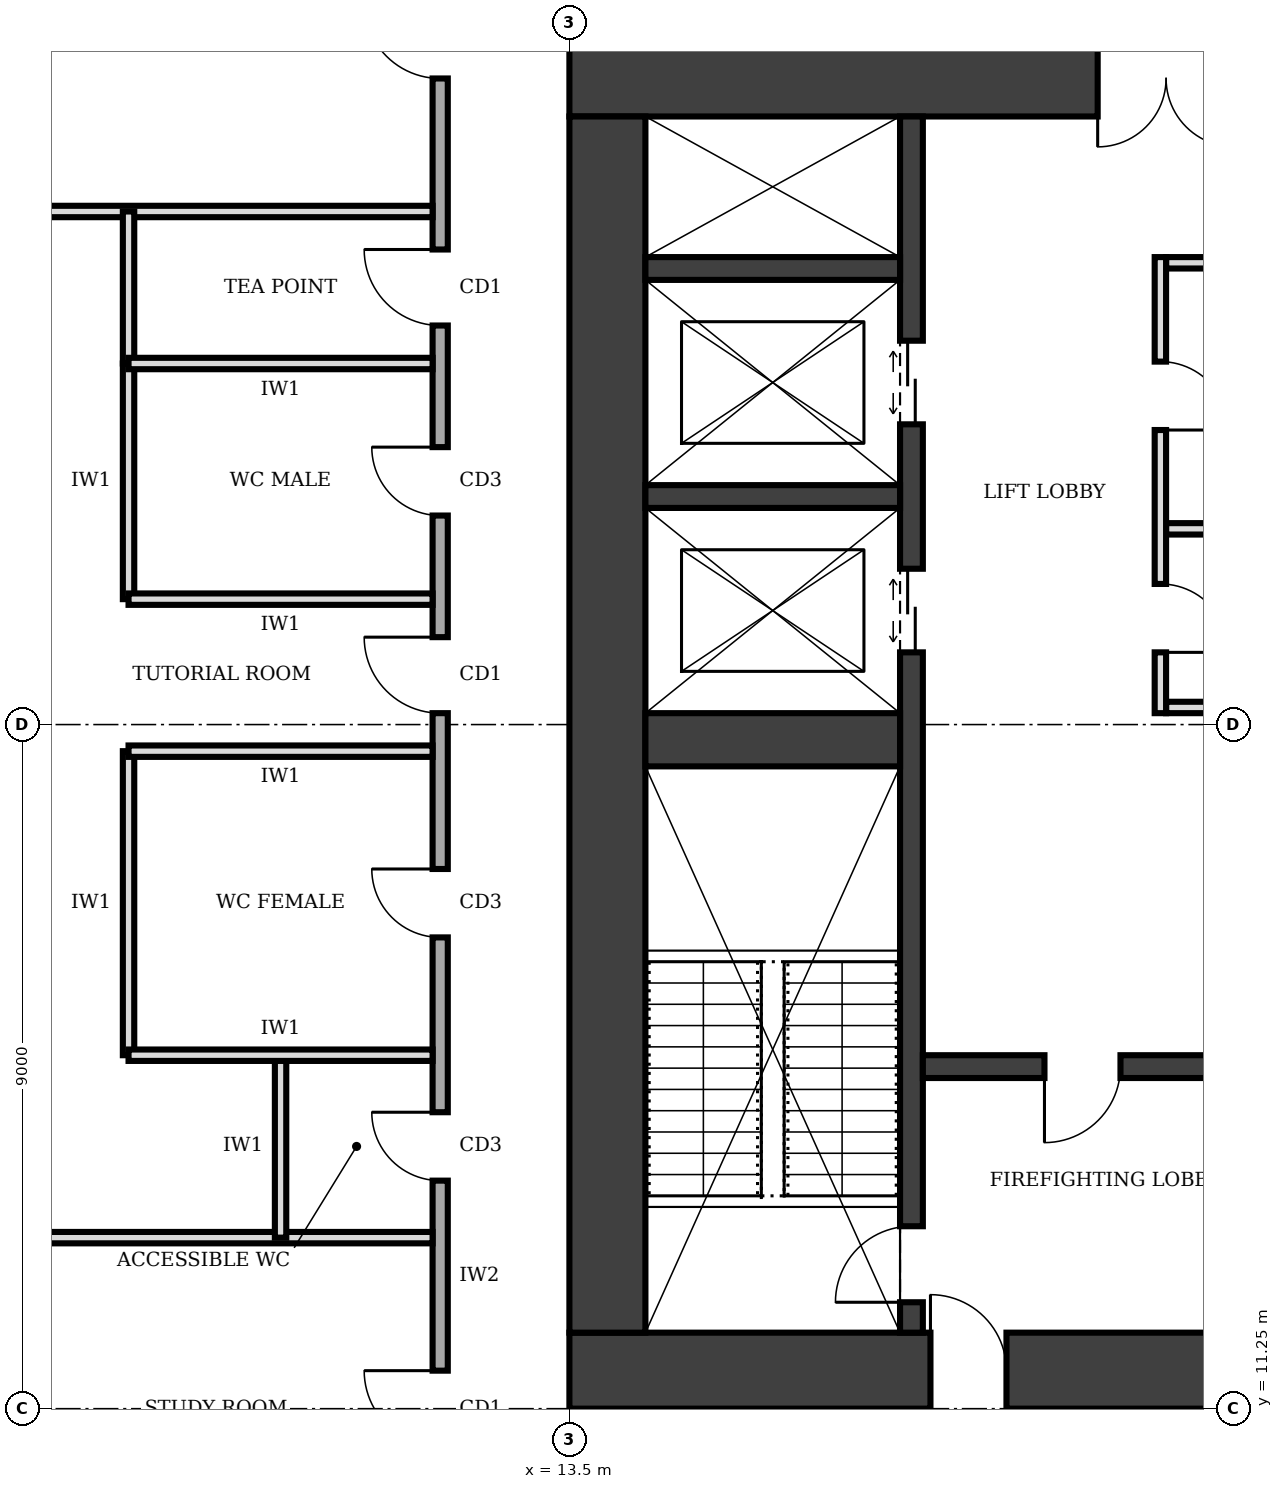
"""IFC4 building model, lengths in metres.
Left out: names, types, materials, properties, quantities, classifications, styles, units other than length and angle.
Written with IfcOpenShell. Run it as: python <this file> out.ifc"""

import sys

from ifc_helpers import new_model, si_unit, direction, frame, frame_2d, origin, place, context, subcontext, project, spatial, rectangle, extrude, element, fill, save


model = new_model("IFC4")
c1 = context("Model", 3, precision=1e-05, world=origin(), true_north=direction((0.0, 1.0)))
c2 = subcontext(c1, "Body", "Model", "MODEL_VIEW")
j1 = project(units=[si_unit("LENGTHUNIT", "METRE"), si_unit("PLANEANGLEUNIT", "RADIAN")], contexts=[c1])
p1 = place(None, origin())
s1 = spatial("IfcSite", under=j1, at=p1, CompositionType="ELEMENT")
p2 = place(p1, origin())
s2 = spatial("IfcBuilding", under=s1, at=p2, CompositionType="ELEMENT")
p3 = place(p2, frame((0.0, 0.0, 45.0)))
s3 = spatial("IfcBuildingStorey", under=s2, at=p3, CompositionType="ELEMENT", Elevation=45.0)
p4 = place(p3, frame((13.5, 11.75, 0.0), z_axis=(0.0, 0.0, 1.0), x_axis=(1.0, 0.0, 0.0)))
e1 = element("IfcWall", 1, at=p4, inside=s3, PredefinedType="SHEAR", context=c2, shape_type="SweptSolid", body=[
    extrude(rectangle(XDim=13.5, YDim=1.0, at=frame_2d((6.75, 0.0))), origin(), (0.0, 0.0, 1.0), 4.0),
])
p5 = place(p4, frame((4.75, 0.0, 0.0)))
e2 = element("IfcOpeningElement", 2, at=p5, cuts=e1, PredefinedType="OPENING", context=c2, shape_type="SweptSolid", body=[
    extrude(rectangle(XDim=1.0, YDim=2.1, at=frame_2d((0.5, 1.05))), frame((0.0, 0.51, 0.0), z_axis=(0.0, -1.0, 0.0), x_axis=(1.0, 0.0, 0.0)), (0.0, 0.0, 1.0), 1.02),
])
p6 = place(p3, frame((27.0, 28.75, 0.0), z_axis=(0.0, 0.0, 1.0), x_axis=(-1.0, 0.0, 0.0)))
e3 = element("IfcWall", 3, at=p6, inside=s3, PredefinedType="SHEAR", context=c2, shape_type="SweptSolid", body=[
    extrude(rectangle(XDim=13.5, YDim=1.0, at=frame_2d((6.75, 0.0))), origin(), (0.0, 0.0, 1.0), 4.0),
])
p7 = place(p6, frame((4.75, 0.0, 0.0)))
e4 = element("IfcOpeningElement", 4, at=p7, cuts=e3, PredefinedType="OPENING", context=c2, shape_type="SweptSolid", body=[
    extrude(rectangle(XDim=1.8, YDim=2.1, at=frame_2d((0.9, 1.05))), frame((0.0, 0.51, 0.0), z_axis=(0.0, -1.0, 0.0), x_axis=(1.0, 0.0, 0.0)), (0.0, 0.0, 1.0), 1.02),
])
p8 = place(p3, frame((14.0, 28.25, 0.0), z_axis=(0.0, 0.0, 1.0), x_axis=(0.0, -1.0, 0.0)))
e5 = element("IfcWall", 5, at=p8, inside=s3, PredefinedType="SHEAR", context=c2, shape_type="SweptSolid", body=[
    extrude(rectangle(XDim=16.0, YDim=1.0, at=frame_2d((8.0, 0.0))), origin(), (0.0, 0.0, 1.0), 4.0),
])
p9 = place(p3, frame((18.0, 12.25, 0.0), z_axis=(0.0, 0.0, 1.0), x_axis=(0.0, 1.0, 0.0)))
e6 = element("IfcWall", 6, at=p9, inside=s3, PredefinedType="SHEAR", context=c2, shape_type="SweptSolid", body=[
    extrude(rectangle(XDim=16.0, YDim=0.3, at=frame_2d((8.0, 0.0))), origin(), (0.0, 0.0, 1.0), 4.0),
])
p10 = place(p9, frame((0.4, 0.0, 0.0)))
e7 = element("IfcOpeningElement", 7, at=p10, cuts=e6, PredefinedType="OPENING", context=c2, shape_type="SweptSolid", body=[
    extrude(rectangle(XDim=1.0, YDim=2.1, at=frame_2d((0.5, 1.05))), frame((0.0, 0.16, 0.0), z_axis=(0.0, -1.0, 0.0), x_axis=(1.0, 0.0, 0.0)), (0.0, 0.0, 1.0), 0.32),
])
p11 = place(p9, frame((8.95, 0.0, 0.0)))
e8 = element("IfcOpeningElement", 8, at=p11, cuts=e6, PredefinedType="OPENING", context=c2, shape_type="SweptSolid", body=[
    extrude(rectangle(XDim=1.1, YDim=2.1, at=frame_2d((0.55, 1.05))), frame((0.0, 0.16, 0.0), z_axis=(0.0, -1.0, 0.0), x_axis=(1.0, 0.0, 0.0)), (0.0, 0.0, 1.0), 0.32),
])
p12 = place(p9, frame((11.95, 0.0, 0.0)))
e9 = element("IfcOpeningElement", 9, at=p12, cuts=e6, PredefinedType="OPENING", context=c2, shape_type="SweptSolid", body=[
    extrude(rectangle(XDim=1.1, YDim=2.1, at=frame_2d((0.55, 1.05))), frame((0.0, 0.16, 0.0), z_axis=(0.0, -1.0, 0.0), x_axis=(1.0, 0.0, 0.0)), (0.0, 0.0, 1.0), 0.32),
])
p13 = place(p3, frame((14.5, 20.05, 0.0), z_axis=(0.0, 0.0, 1.0), x_axis=(1.0, 0.0, 0.0)))
e10 = element("IfcWall", 10, at=p13, inside=s3, PredefinedType="SHEAR", context=c2, shape_type="SweptSolid", body=[
    extrude(rectangle(XDim=3.35, YDim=0.7, at=frame_2d((1.675, 0.0))), origin(), (0.0, 0.0, 1.0), 4.0),
])
p14 = place(p3, frame((18.15, 15.75, 0.0), z_axis=(0.0, 0.0, 1.0), x_axis=(1.0, 0.0, 0.0)))
e11 = element("IfcWall", 11, at=p14, inside=s3, PredefinedType="SHEAR", context=c2, shape_type="SweptSolid", body=[
    extrude(rectangle(XDim=4.2, YDim=0.3, at=frame_2d((2.1, 0.0))), origin(), (0.0, 0.0, 1.0), 4.0),
])
p15 = place(p14, frame((1.6, 0.0, 0.0)))
e12 = element("IfcOpeningElement", 12, at=p15, cuts=e11, PredefinedType="OPENING", context=c2, shape_type="SweptSolid", body=[
    extrude(rectangle(XDim=1.0, YDim=2.1, at=frame_2d((0.5, 1.05))), frame((0.0, 0.16, 0.0), z_axis=(0.0, -1.0, 0.0), x_axis=(1.0, 0.0, 0.0)), (0.0, 0.0, 1.0), 0.32),
])
for number, where, z_axis, x_axis in (
    (13, (14.5, 23.25, 0.0), (0.0, 0.0, 1.0), (1.0, 0.0, 0.0)),
    (14, (14.5, 26.25, 0.0), (0.0, 0.0, 1.0), (1.0, 0.0, 0.0)),
):
    element("IfcWall", number, at=place(p3, frame(where, z_axis=z_axis, x_axis=x_axis)), inside=s3, PredefinedType="SHEAR", context=c2, shape_type="SweptSolid", body=[
        extrude(rectangle(XDim=3.35, YDim=0.3, at=frame_2d((1.675, 0.0))), origin(), (0.0, 0.0, 1.0), 4.0),
    ])
p16 = place(p3, frame((21.275, 20.4, 0.0), z_axis=(0.0, 0.0, 1.0), x_axis=(0.0, 1.0, 0.0)))
e15 = element("IfcWall", 15, at=p16, inside=s3, PredefinedType="PARTITIONING", context=c2, shape_type="SweptSolid", body=[
    extrude(rectangle(XDim=6.0, YDim=0.15, at=frame_2d((3.0, 0.0))), origin(), (0.0, 0.0, 1.0), 3.75),
])
p17 = place(p16, frame((0.8, 0.0, 0.0)))
e16 = element("IfcOpeningElement", 16, at=p17, cuts=e15, PredefinedType="OPENING", context=c2, shape_type="SweptSolid", body=[
    extrude(rectangle(XDim=0.9, YDim=2.1, at=frame_2d((0.45, 1.05))), frame((0.0, 0.085, 0.0), z_axis=(0.0, -1.0, 0.0), x_axis=(1.0, 0.0, 0.0)), (0.0, 0.0, 1.0), 0.17),
])
p18 = place(p16, frame((3.725, 0.0, 0.0)))
e17 = element("IfcOpeningElement", 17, at=p18, cuts=e15, PredefinedType="OPENING", context=c2, shape_type="SweptSolid", body=[
    extrude(rectangle(XDim=0.9, YDim=2.1, at=frame_2d((0.45, 1.05))), frame((0.0, 0.085, 0.0), z_axis=(0.0, -1.0, 0.0), x_axis=(1.0, 0.0, 0.0)), (0.0, 0.0, 1.0), 0.17),
])
for number, where, z_axis, x_axis in (
    (18, (21.35, 20.475, 0.0), (0.0, 0.0, 1.0), (1.0, 0.0, 0.0)),
    (19, (21.35, 22.825, 0.0), (0.0, 0.0, 1.0), (1.0, 0.0, 0.0)),
    (20, (21.35, 26.325, 0.0), (0.0, 0.0, 1.0), (1.0, 0.0, 0.0)),
):
    element("IfcWall", number, at=place(p3, frame(where, z_axis=z_axis, x_axis=x_axis)), inside=s3, PredefinedType="PARTITIONING", context=c2, shape_type="SweptSolid", body=[
        extrude(rectangle(XDim=1.0, YDim=0.15, at=frame_2d((0.5, 0.0))), origin(), (0.0, 0.0, 1.0), 3.75),
    ])
p19 = place(p3, frame((11.8, 31.3, 0.0), z_axis=(0.0, 0.0, 1.0), x_axis=(0.0, -1.0, 0.0)))
e21 = element("IfcWall", 21, at=p19, inside=s3, PredefinedType="SOLIDWALL", context=c2, shape_type="SweptSolid", body=[
    extrude(rectangle(XDim=22.3, YDim=0.2, at=frame_2d((11.15, 0.0))), origin(), (0.0, 0.0, 1.0), 3.75),
])
p20 = place(p19, frame((19.55, 0.0, 0.0)))
e22 = element("IfcOpeningElement", 22, at=p20, cuts=e21, PredefinedType="OPENING", context=c2, shape_type="SweptSolid", body=[
    extrude(rectangle(XDim=1.0, YDim=2.1, at=frame_2d((0.5, 1.05))), frame((0.0, 0.11, 0.0), z_axis=(0.0, -1.0, 0.0), x_axis=(1.0, 0.0, 0.0)), (0.0, 0.0, 1.0), 0.22),
])
p21 = place(p19, frame((16.15, 0.0, 0.0)))
e23 = element("IfcOpeningElement", 23, at=p21, cuts=e21, PredefinedType="OPENING", context=c2, shape_type="SweptSolid", body=[
    extrude(rectangle(XDim=0.9, YDim=2.1, at=frame_2d((0.45, 1.05))), frame((0.0, 0.11, 0.0), z_axis=(0.0, -1.0, 0.0), x_axis=(1.0, 0.0, 0.0)), (0.0, 0.0, 1.0), 0.22),
])
p22 = place(p19, frame((12.95, 0.0, 0.0)))
e24 = element("IfcOpeningElement", 24, at=p22, cuts=e21, PredefinedType="OPENING", context=c2, shape_type="SweptSolid", body=[
    extrude(rectangle(XDim=0.9, YDim=2.1, at=frame_2d((0.45, 1.05))), frame((0.0, 0.11, 0.0), z_axis=(0.0, -1.0, 0.0), x_axis=(1.0, 0.0, 0.0)), (0.0, 0.0, 1.0), 0.22),
])
p23 = place(p19, frame((7.4, 0.0, 0.0)))
e25 = element("IfcOpeningElement", 25, at=p23, cuts=e21, PredefinedType="OPENING", context=c2, shape_type="SweptSolid", body=[
    extrude(rectangle(XDim=0.9, YDim=2.1, at=frame_2d((0.45, 1.05))), frame((0.0, 0.11, 0.0), z_axis=(0.0, -1.0, 0.0), x_axis=(1.0, 0.0, 0.0)), (0.0, 0.0, 1.0), 0.22),
])
p24 = place(p19, frame((4.8, 0.0, 0.0)))
e26 = element("IfcOpeningElement", 26, at=p24, cuts=e21, PredefinedType="OPENING", context=c2, shape_type="SweptSolid", body=[
    extrude(rectangle(XDim=1.0, YDim=2.1, at=frame_2d((0.5, 1.05))), frame((0.0, 0.11, 0.0), z_axis=(0.0, -1.0, 0.0), x_axis=(1.0, 0.0, 0.0)), (0.0, 0.0, 1.0), 0.22),
])
p25 = place(p19, frame((9.9, 0.0, 0.0)))
e27 = element("IfcOpeningElement", 27, at=p25, cuts=e21, PredefinedType="OPENING", context=c2, shape_type="SweptSolid", body=[
    extrude(rectangle(XDim=1.0, YDim=2.1, at=frame_2d((0.5, 1.05))), frame((0.0, 0.11, 0.0), z_axis=(0.0, -1.0, 0.0), x_axis=(1.0, 0.0, 0.0)), (0.0, 0.0, 1.0), 0.22),
])
p26 = place(p19, frame((1.55, 0.0, 0.0)))
e28 = element("IfcOpeningElement", 28, at=p26, cuts=e21, PredefinedType="OPENING", context=c2, shape_type="SweptSolid", body=[
    extrude(rectangle(XDim=1.0, YDim=2.1, at=frame_2d((0.5, 1.05))), frame((0.0, 0.11, 0.0), z_axis=(0.0, -1.0, 0.0), x_axis=(1.0, 0.0, 0.0)), (0.0, 0.0, 1.0), 0.22),
])
for number, where, z_axis, x_axis in (
    (29, (0.3, 13.5, 0.0), (0.0, 0.0, 1.0), (1.0, 0.0, 0.0)),
    (30, (0.3, 27.0, 0.0), (0.0, 0.0, 1.0), (1.0, 0.0, 0.0)),
):
    element("IfcWall", number, at=place(p3, frame(where, z_axis=z_axis, x_axis=x_axis)), inside=s3, PredefinedType="PARTITIONING", context=c2, shape_type="SweptSolid", body=[
        extrude(rectangle(XDim=11.4, YDim=0.15, at=frame_2d((5.7, 0.0))), origin(), (0.0, 0.0, 1.0), 3.75),
    ])
p27 = place(p3, frame((11.7, 15.9, 0.0), z_axis=(0.0, 0.0, 1.0), x_axis=(-1.0, 0.0, 0.0)))
e31 = element("IfcWall", 31, at=p27, inside=s3, PredefinedType="PARTITIONING", context=c2, shape_type="SweptSolid", body=[
    extrude(rectangle(XDim=4.0, YDim=0.15, at=frame_2d((2.0, 0.0))), origin(), (0.0, 0.0, 1.0), 3.75),
])
p28 = place(p3, frame((11.7, 19.9, 0.0), z_axis=(0.0, 0.0, 1.0), x_axis=(-1.0, 0.0, 0.0)))
e32 = element("IfcWall", 32, at=p28, inside=s3, PredefinedType="PARTITIONING", context=c2, shape_type="SweptSolid", body=[
    extrude(rectangle(XDim=4.0, YDim=0.15, at=frame_2d((2.0, 0.0))), origin(), (0.0, 0.0, 1.0), 2.85),
])
for number, where, z_axis, x_axis in (
    (33, (11.7, 21.9, 0.0), (0.0, 0.0, 1.0), (-1.0, 0.0, 0.0)),
    (34, (11.7, 25.0, 0.0), (0.0, 0.0, 1.0), (-1.0, 0.0, 0.0)),
):
    element("IfcWall", number, at=place(p3, frame(where, z_axis=z_axis, x_axis=x_axis)), inside=s3, PredefinedType="PARTITIONING", context=c2, shape_type="SweptSolid", body=[
        extrude(rectangle(XDim=4.0, YDim=0.15, at=frame_2d((2.0, 0.0))), origin(), (0.0, 0.0, 1.0), 3.75),
    ])
p29 = place(p3, frame((9.7, 13.5, 0.0), z_axis=(0.0, 0.0, 1.0), x_axis=(0.0, 1.0, 0.0)))
e35 = element("IfcWall", 35, at=p29, inside=s3, PredefinedType="PARTITIONING", context=c2, shape_type="SweptSolid", body=[
    extrude(rectangle(XDim=2.4, YDim=0.15, at=frame_2d((1.2, 0.0))), origin(), (0.0, 0.0, 1.0), 3.75),
])
p30 = place(p3, frame((7.7, 15.9, 0.0), z_axis=(0.0, 0.0, 1.0), x_axis=(0.0, 1.0, 0.0)))
e36 = element("IfcWall", 36, at=p30, inside=s3, PredefinedType="PARTITIONING", context=c2, shape_type="SweptSolid", body=[
    extrude(rectangle(XDim=4.0, YDim=0.15, at=frame_2d((2.0, 0.0))), origin(), (0.0, 0.0, 1.0), 3.75),
])
p31 = place(p3, frame((7.7, 21.9, 0.0), z_axis=(0.0, 0.0, 1.0), x_axis=(0.0, 1.0, 0.0)))
e37 = element("IfcWall", 37, at=p31, inside=s3, PredefinedType="PARTITIONING", context=c2, shape_type="SweptSolid", body=[
    extrude(rectangle(XDim=3.1, YDim=0.15, at=frame_2d((1.55, 0.0))), origin(), (0.0, 0.0, 1.0), 3.75),
])
p32 = place(p3, frame((7.7, 25.0, 0.0), z_axis=(0.0, 0.0, 1.0), x_axis=(0.0, 1.0, 0.0)))
e38 = element("IfcWall", 38, at=p32, inside=s3, PredefinedType="PARTITIONING", context=c2, shape_type="SweptSolid", body=[
    extrude(rectangle(XDim=2.0, YDim=0.15, at=frame_2d((1.0, 0.0))), origin(), (0.0, 0.0, 1.0), 3.75),
])
p33 = place(p5, origin())
e39 = element("IfcDoor", 39, at=p33, inside=s3, OperationType="SINGLE_SWING_LEFT", PredefinedType="DOOR", context=c2, shape_type="SweptSolid", body=[
    extrude(rectangle(XDim=1.0, YDim=2.1, at=frame_2d((0.5, 1.05))), frame((0.0, 0.025, 0.0), z_axis=(0.0, -1.0, 0.0), x_axis=(1.0, 0.0, 0.0)), (0.0, 0.0, 1.0), 0.05),
])
fill(e2, e39)
p34 = place(p7, origin())
e40 = element("IfcDoor", 40, at=p34, inside=s3, OperationType="DOUBLE_DOOR_SINGLE_SWING", PredefinedType="DOOR", context=c2, shape_type="SweptSolid", body=[
    extrude(rectangle(XDim=1.8, YDim=2.1, at=frame_2d((0.9, 1.05))), frame((0.0, 0.025, 0.0), z_axis=(0.0, -1.0, 0.0), x_axis=(1.0, 0.0, 0.0)), (0.0, 0.0, 1.0), 0.05),
])
fill(e4, e40)
p35 = place(p15, frame((1.0, 0.0, 0.0), z_axis=(0.0, 0.0, 1.0), x_axis=(-1.0, 0.0, 0.0)))
e41 = element("IfcDoor", 41, at=p35, inside=s3, OperationType="SINGLE_SWING_RIGHT", PredefinedType="DOOR", context=c2, shape_type="SweptSolid", body=[
    extrude(rectangle(XDim=1.0, YDim=2.1, at=frame_2d((0.5, 1.05))), frame((0.0, 0.025, 0.0), z_axis=(0.0, -1.0, 0.0), x_axis=(1.0, 0.0, 0.0)), (0.0, 0.0, 1.0), 0.05),
])
fill(e12, e41)
p36 = place(p10, origin())
e42 = element("IfcDoor", 42, at=p36, inside=s3, OperationType="SINGLE_SWING_LEFT", PredefinedType="DOOR", context=c2, shape_type="SweptSolid", body=[
    extrude(rectangle(XDim=1.0, YDim=2.1, at=frame_2d((0.5, 1.05))), frame((0.0, 0.025, 0.0), z_axis=(0.0, -1.0, 0.0), x_axis=(1.0, 0.0, 0.0)), (0.0, 0.0, 1.0), 0.05),
])
fill(e7, e42)
p37 = place(p11, origin())
e43 = element("IfcDoor", 43, at=p37, inside=s3, OperationType="DOUBLE_DOOR_SLIDING", PredefinedType="DOOR", context=c2, shape_type="SweptSolid", body=[
    extrude(rectangle(XDim=1.1, YDim=2.1, at=frame_2d((0.55, 1.05))), frame((0.0, 0.025, 0.0), z_axis=(0.0, -1.0, 0.0), x_axis=(1.0, 0.0, 0.0)), (0.0, 0.0, 1.0), 0.05),
])
fill(e8, e43)
p38 = place(p12, origin())
e44 = element("IfcDoor", 44, at=p38, inside=s3, OperationType="DOUBLE_DOOR_SLIDING", PredefinedType="DOOR", context=c2, shape_type="SweptSolid", body=[
    extrude(rectangle(XDim=1.1, YDim=2.1, at=frame_2d((0.55, 1.05))), frame((0.0, 0.025, 0.0), z_axis=(0.0, -1.0, 0.0), x_axis=(1.0, 0.0, 0.0)), (0.0, 0.0, 1.0), 0.05),
])
fill(e9, e44)
p39 = place(p17, frame((0.9, 0.0, 0.0), z_axis=(0.0, 0.0, 1.0), x_axis=(-1.0, 0.0, 0.0)))
e45 = element("IfcDoor", 45, at=p39, inside=s3, OperationType="SINGLE_SWING_RIGHT", PredefinedType="DOOR", context=c2, shape_type="SweptSolid", body=[
    extrude(rectangle(XDim=0.9, YDim=2.1, at=frame_2d((0.45, 1.05))), frame((0.0, 0.025, 0.0), z_axis=(0.0, -1.0, 0.0), x_axis=(1.0, 0.0, 0.0)), (0.0, 0.0, 1.0), 0.05),
])
fill(e16, e45)
p40 = place(p18, frame((0.9, 0.0, 0.0), z_axis=(0.0, 0.0, 1.0), x_axis=(-1.0, 0.0, 0.0)))
e46 = element("IfcDoor", 46, at=p40, inside=s3, OperationType="SINGLE_SWING_RIGHT", PredefinedType="DOOR", context=c2, shape_type="SweptSolid", body=[
    extrude(rectangle(XDim=0.9, YDim=2.1, at=frame_2d((0.45, 1.05))), frame((0.0, 0.025, 0.0), z_axis=(0.0, -1.0, 0.0), x_axis=(1.0, 0.0, 0.0)), (0.0, 0.0, 1.0), 0.05),
])
fill(e17, e46)
p41 = place(p20, frame((1.0, 0.0, 0.0), z_axis=(0.0, 0.0, 1.0), x_axis=(-1.0, 0.0, 0.0)))
e47 = element("IfcDoor", 47, at=p41, inside=s3, OperationType="SINGLE_SWING_RIGHT", PredefinedType="DOOR", context=c2, shape_type="SweptSolid", body=[
    extrude(rectangle(XDim=1.0, YDim=2.1, at=frame_2d((0.5, 1.05))), frame((0.0, 0.025, 0.0), z_axis=(0.0, -1.0, 0.0), x_axis=(1.0, 0.0, 0.0)), (0.0, 0.0, 1.0), 0.05),
])
fill(e22, e47)
p42 = place(p21, frame((0.9, 0.0, 0.0), z_axis=(0.0, 0.0, 1.0), x_axis=(-1.0, 0.0, 0.0)))
e48 = element("IfcDoor", 48, at=p42, inside=s3, OperationType="SINGLE_SWING_RIGHT", PredefinedType="DOOR", context=c2, shape_type="SweptSolid", body=[
    extrude(rectangle(XDim=0.9, YDim=2.1, at=frame_2d((0.45, 1.05))), frame((0.0, 0.025, 0.0), z_axis=(0.0, -1.0, 0.0), x_axis=(1.0, 0.0, 0.0)), (0.0, 0.0, 1.0), 0.05),
])
fill(e23, e48)
p43 = place(p22, frame((0.9, 0.0, 0.0), z_axis=(0.0, 0.0, 1.0), x_axis=(-1.0, 0.0, 0.0)))
e49 = element("IfcDoor", 49, at=p43, inside=s3, OperationType="SINGLE_SWING_RIGHT", PredefinedType="DOOR", context=c2, shape_type="SweptSolid", body=[
    extrude(rectangle(XDim=0.9, YDim=2.1, at=frame_2d((0.45, 1.05))), frame((0.0, 0.025, 0.0), z_axis=(0.0, -1.0, 0.0), x_axis=(1.0, 0.0, 0.0)), (0.0, 0.0, 1.0), 0.05),
])
fill(e24, e49)
p44 = place(p23, frame((0.9, 0.0, 0.0), z_axis=(0.0, 0.0, 1.0), x_axis=(-1.0, 0.0, 0.0)))
e50 = element("IfcDoor", 50, at=p44, inside=s3, OperationType="SINGLE_SWING_RIGHT", PredefinedType="DOOR", context=c2, shape_type="SweptSolid", body=[
    extrude(rectangle(XDim=0.9, YDim=2.1, at=frame_2d((0.45, 1.05))), frame((0.0, 0.025, 0.0), z_axis=(0.0, -1.0, 0.0), x_axis=(1.0, 0.0, 0.0)), (0.0, 0.0, 1.0), 0.05),
])
fill(e25, e50)
p45 = place(p24, frame((1.0, 0.0, 0.0), z_axis=(0.0, 0.0, 1.0), x_axis=(-1.0, 0.0, 0.0)))
e51 = element("IfcDoor", 51, at=p45, inside=s3, OperationType="SINGLE_SWING_RIGHT", PredefinedType="DOOR", context=c2, shape_type="SweptSolid", body=[
    extrude(rectangle(XDim=1.0, YDim=2.1, at=frame_2d((0.5, 1.05))), frame((0.0, 0.025, 0.0), z_axis=(0.0, -1.0, 0.0), x_axis=(1.0, 0.0, 0.0)), (0.0, 0.0, 1.0), 0.05),
])
fill(e26, e51)
p46 = place(p25, frame((1.0, 0.0, 0.0), z_axis=(0.0, 0.0, 1.0), x_axis=(-1.0, 0.0, 0.0)))
e52 = element("IfcDoor", 52, at=p46, inside=s3, OperationType="SINGLE_SWING_RIGHT", PredefinedType="DOOR", context=c2, shape_type="SweptSolid", body=[
    extrude(rectangle(XDim=1.0, YDim=2.1, at=frame_2d((0.5, 1.05))), frame((0.0, 0.025, 0.0), z_axis=(0.0, -1.0, 0.0), x_axis=(1.0, 0.0, 0.0)), (0.0, 0.0, 1.0), 0.05),
])
fill(e27, e52)
p47 = place(p26, frame((1.0, 0.0, 0.0), z_axis=(0.0, 0.0, 1.0), x_axis=(-1.0, 0.0, 0.0)))
e53 = element("IfcDoor", 53, at=p47, inside=s3, OperationType="SINGLE_SWING_RIGHT", PredefinedType="DOOR", context=c2, shape_type="SweptSolid", body=[
    extrude(rectangle(XDim=1.0, YDim=2.1, at=frame_2d((0.5, 1.05))), frame((0.0, 0.025, 0.0), z_axis=(0.0, -1.0, 0.0), x_axis=(1.0, 0.0, 0.0)), (0.0, 0.0, 1.0), 0.05),
])
fill(e28, e53)
save(model, sys.argv[1])
